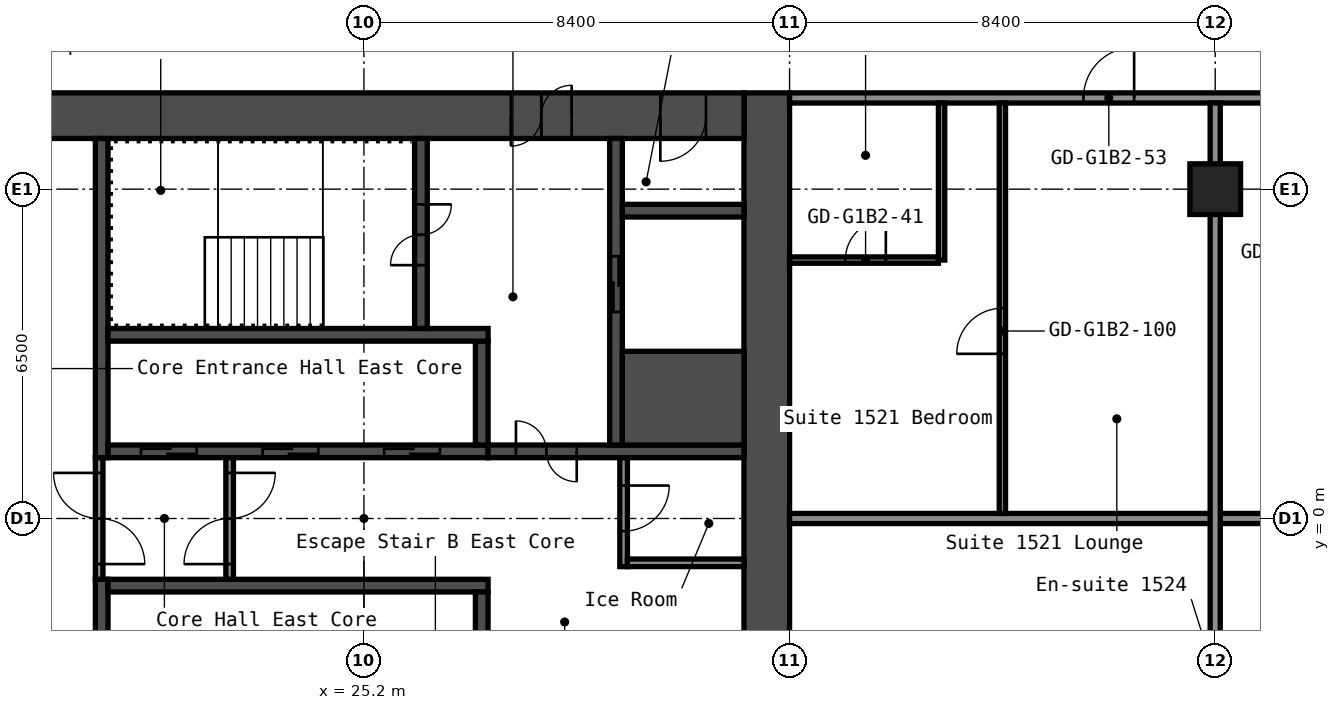
"""IFC4 building model, lengths in metres.
Left out: names, types, materials, properties, quantities, classifications, styles, units other than length and angle.
Written with IfcOpenShell. Run it as: python <this file> out.ifc"""

import sys

from ifc_helpers import new_model, si_unit, direction, frame, frame_2d, origin, origin_2d, place, context, subcontext, project, spatial, rectangle, hollow_rectangle, extrude, element, fill, save


model = new_model("IFC4")
c1 = context("Model", 3, precision=1e-05, world=origin(), true_north=direction((0.0, 1.0)))
c2 = subcontext(c1, "Body", "Model", "MODEL_VIEW")
j1 = project(units=[si_unit("LENGTHUNIT", "METRE"), si_unit("PLANEANGLEUNIT", "RADIAN")], contexts=[c1])
p1 = place(None, origin())
s1 = spatial("IfcSite", under=j1, at=p1, CompositionType="ELEMENT")
p2 = place(p1, origin())
s2 = spatial("IfcBuilding", under=s1, at=p2, CompositionType="ELEMENT")
p3 = place(p2, frame((0.0, 0.0, 55.0)))
s3 = spatial("IfcBuildingStorey", under=s2, at=p3, CompositionType="ELEMENT", Elevation=55.0)
p4 = place(p3, frame((42.0, 6.5, 0.0), z_axis=(0.0, 0.0, 1.0), x_axis=(1.0, 0.0, 0.0)))
e1 = element("IfcColumn", 1, at=p4, inside=s3, PredefinedType="COLUMN", context=c2, shape_type="SweptSolid", body=[
    extrude(hollow_rectangle(XDim=1.0, YDim=1.0, WallThickness=0.04, at=origin_2d()), origin(), (0.0, 0.0, 1.0), 2.8),
])
p5 = place(p3, frame((33.15, -8.4, 0.0), z_axis=(0.0, 0.0, 1.0), x_axis=(0.0, 1.0, 0.0)))
e2 = element("IfcWall", 2, at=p5, inside=s3, PredefinedType="SHEAR", context=c2, shape_type="SweptSolid", body=[
    extrude(rectangle(XDim=16.8, YDim=0.9, at=frame_2d((8.4, 0.0))), origin(), (0.0, 0.0, 1.0), 2.8),
])
p6 = place(p3, frame((17.7, 7.95, 0.0), z_axis=(0.0, 0.0, 1.0), x_axis=(1.0, 0.0, 0.0)))
e3 = element("IfcWall", 3, at=p6, inside=s3, PredefinedType="SHEAR", context=c2, shape_type="SweptSolid", body=[
    extrude(rectangle(XDim=15.0, YDim=0.9, at=frame_2d((7.5, 0.0))), origin(), (0.0, 0.0, 1.0), 2.8),
])
p7 = place(p6, frame((10.4, 0.0, 0.0)))
e4 = element("IfcOpeningElement", 4, at=p7, cuts=e3, PredefinedType="OPENING", context=c2, shape_type="SweptSolid", body=[
    extrude(rectangle(XDim=1.2, YDim=2.1, at=frame_2d((0.6, 1.05))), frame((0.0, 0.46, 0.0), z_axis=(0.0, -1.0, 0.0), x_axis=(1.0, 0.0, 0.0)), (0.0, 0.0, 1.0), 0.92),
])
p8 = place(p6, frame((13.35, 0.0, 0.0)))
e5 = element("IfcOpeningElement", 5, at=p8, cuts=e3, PredefinedType="OPENING", context=c2, shape_type="SweptSolid", body=[
    extrude(rectangle(XDim=0.9, YDim=2.1, at=frame_2d((0.45, 1.05))), frame((0.0, 0.46, 0.0), z_axis=(0.0, -1.0, 0.0), x_axis=(1.0, 0.0, 0.0)), (0.0, 0.0, 1.0), 0.92),
])
p9 = place(p3, frame((20.025, 1.2, 0.0), z_axis=(0.0, 0.0, 1.0), x_axis=(0.0, 1.0, 0.0)))
e6 = element("IfcWall", 6, at=p9, inside=s3, PredefinedType="SHEAR", context=c2, shape_type="SweptSolid", body=[
    extrude(rectangle(XDim=6.3, YDim=0.25, at=frame_2d((3.15, 0.0))), origin(), (0.0, 0.0, 1.0), 2.8),
])
p10 = place(p3, frame((20.025, -7.5, 0.0), z_axis=(0.0, 0.0, 1.0), x_axis=(0.0, 1.0, 0.0)))
e7 = element("IfcWall", 7, at=p10, inside=s3, PredefinedType="SHEAR", context=c2, shape_type="SweptSolid", body=[
    extrude(rectangle(XDim=6.3, YDim=0.25, at=frame_2d((3.15, 0.0))), origin(), (0.0, 0.0, 1.0), 2.8),
])
p11 = place(p10, frame((2.4, 0.0, 0.0)))
e8 = element("IfcOpeningElement", 8, at=p11, cuts=e7, PredefinedType="OPENING", context=c2, shape_type="SweptSolid", body=[
    extrude(rectangle(XDim=1.0, YDim=2.1, at=frame_2d((0.5, 1.05))), frame((0.0, 0.135, 0.0), z_axis=(0.0, -1.0, 0.0), x_axis=(1.0, 0.0, 0.0)), (0.0, 0.0, 1.0), 0.27),
])
p12 = place(p3, frame((20.15, 1.325, 0.0), z_axis=(0.0, 0.0, 1.0), x_axis=(1.0, 0.0, 0.0)))
e9 = element("IfcWall", 9, at=p12, inside=s3, PredefinedType="SHEAR", context=c2, shape_type="SweptSolid", body=[
    extrude(rectangle(XDim=7.5, YDim=0.25, at=frame_2d((3.75, 0.0))), origin(), (0.0, 0.0, 1.0), 2.8),
])
p13 = place(p12, frame((0.65, 0.0, 0.0)))
e10 = element("IfcOpeningElement", 10, at=p13, cuts=e9, PredefinedType="OPENING", context=c2, shape_type="SweptSolid", body=[
    extrude(rectangle(XDim=1.1, YDim=2.1, at=frame_2d((0.55, 1.05))), frame((0.0, 0.135, 0.0), z_axis=(0.0, -1.0, 0.0), x_axis=(1.0, 0.0, 0.0)), (0.0, 0.0, 1.0), 0.27),
])
p14 = place(p12, frame((3.05, 0.0, 0.0)))
e11 = element("IfcOpeningElement", 11, at=p14, cuts=e9, PredefinedType="OPENING", context=c2, shape_type="SweptSolid", body=[
    extrude(rectangle(XDim=1.1, YDim=2.1, at=frame_2d((0.55, 1.05))), frame((0.0, 0.135, 0.0), z_axis=(0.0, -1.0, 0.0), x_axis=(1.0, 0.0, 0.0)), (0.0, 0.0, 1.0), 0.27),
])
p15 = place(p12, frame((5.45, 0.0, 0.0)))
e12 = element("IfcOpeningElement", 12, at=p15, cuts=e9, PredefinedType="OPENING", context=c2, shape_type="SweptSolid", body=[
    extrude(rectangle(XDim=1.1, YDim=2.1, at=frame_2d((0.55, 1.05))), frame((0.0, 0.135, 0.0), z_axis=(0.0, -1.0, 0.0), x_axis=(1.0, 0.0, 0.0)), (0.0, 0.0, 1.0), 0.27),
])
p16 = place(p3, frame((27.525, 1.45, 0.0), z_axis=(0.0, 0.0, 1.0), x_axis=(0.0, 1.0, 0.0)))
e13 = element("IfcWall", 13, at=p16, inside=s3, PredefinedType="SHEAR", context=c2, shape_type="SweptSolid", body=[
    extrude(rectangle(XDim=2.05, YDim=0.25, at=frame_2d((1.025, 0.0))), origin(), (0.0, 0.0, 1.0), 2.8),
])
p17 = place(p3, frame((20.15, 3.625, 0.0), z_axis=(0.0, 0.0, 1.0), x_axis=(1.0, 0.0, 0.0)))
e14 = element("IfcWall", 14, at=p17, inside=s3, PredefinedType="SHEAR", context=c2, shape_type="SweptSolid", body=[
    extrude(rectangle(XDim=7.5, YDim=0.25, at=frame_2d((3.75, 0.0))), origin(), (0.0, 0.0, 1.0), 2.8),
])
p18 = place(p3, frame((26.325, 3.75, 0.0), z_axis=(0.0, 0.0, 1.0), x_axis=(0.0, 1.0, 0.0)))
e15 = element("IfcWall", 15, at=p18, inside=s3, PredefinedType="SHEAR", context=c2, shape_type="SweptSolid", body=[
    extrude(rectangle(XDim=3.75, YDim=0.25, at=frame_2d((1.875, 0.0))), origin(), (0.0, 0.0, 1.0), 2.8),
])
p19 = place(p18, frame((1.25, 0.0, 0.0)))
e16 = element("IfcOpeningElement", 16, at=p19, cuts=e15, PredefinedType="OPENING", context=c2, shape_type="SweptSolid", body=[
    extrude(rectangle(XDim=1.2, YDim=2.1, at=frame_2d((0.6, 1.05))), frame((0.0, 0.135, 0.0), z_axis=(0.0, -1.0, 0.0), x_axis=(1.0, 0.0, 0.0)), (0.0, 0.0, 1.0), 0.27),
])
p20 = place(p3, frame((27.65, 1.325, 0.0), z_axis=(0.0, 0.0, 1.0), x_axis=(1.0, 0.0, 0.0)))
e17 = element("IfcWall", 17, at=p20, inside=s3, PredefinedType="SHEAR", context=c2, shape_type="SweptSolid", body=[
    extrude(rectangle(XDim=5.05, YDim=0.25, at=frame_2d((2.525, 0.0))), origin(), (0.0, 0.0, 1.0), 2.8),
])
p21 = place(p20, frame((0.55, 0.0, 0.0)))
e18 = element("IfcOpeningElement", 18, at=p21, cuts=e17, PredefinedType="OPENING", context=c2, shape_type="SweptSolid", body=[
    extrude(rectangle(XDim=1.2, YDim=2.1, at=frame_2d((0.6, 1.05))), frame((0.0, 0.135, 0.0), z_axis=(0.0, -1.0, 0.0), x_axis=(1.0, 0.0, 0.0)), (0.0, 0.0, 1.0), 0.27),
])
p22 = place(p3, frame((30.175, 1.45, 0.0), z_axis=(0.0, 0.0, 1.0), x_axis=(0.0, 1.0, 0.0)))
e19 = element("IfcWall", 19, at=p22, inside=s3, PredefinedType="SHEAR", context=c2, shape_type="SweptSolid", body=[
    extrude(rectangle(XDim=6.05, YDim=0.25, at=frame_2d((3.025, 0.0))), origin(), (0.0, 0.0, 1.0), 2.8),
])
p23 = place(p22, frame((2.625, 0.0, 0.0)))
e20 = element("IfcOpeningElement", 20, at=p23, cuts=e19, PredefinedType="OPENING", context=c2, shape_type="SweptSolid", body=[
    extrude(rectangle(XDim=1.1, YDim=2.1, at=frame_2d((0.55, 1.05))), frame((0.0, 0.135, 0.0), z_axis=(0.0, -1.0, 0.0), x_axis=(1.0, 0.0, 0.0)), (0.0, 0.0, 1.0), 0.27),
])
p24 = place(p3, frame((30.3, 2.375, 0.0), z_axis=(0.0, 0.0, 1.0), x_axis=(1.0, 0.0, 0.0)))
e21 = element("IfcWall", 21, at=p24, inside=s3, PredefinedType="SHEAR", context=c2, shape_type="SweptSolid", body=[
    extrude(rectangle(XDim=2.4, YDim=1.85, at=frame_2d((1.2, 0.0))), origin(), (0.0, 0.0, 1.0), 2.8),
])
p25 = place(p3, frame((30.3, 6.075, 0.0), z_axis=(0.0, 0.0, 1.0), x_axis=(1.0, 0.0, 0.0)))
e22 = element("IfcWall", 22, at=p25, inside=s3, PredefinedType="SHEAR", context=c2, shape_type="SweptSolid", body=[
    extrude(rectangle(XDim=2.4, YDim=0.25, at=frame_2d((1.2, 0.0))), origin(), (0.0, 0.0, 1.0), 2.8),
])
p26 = place(p3, frame((20.15, -1.325, 0.0), z_axis=(0.0, 0.0, 1.0), x_axis=(1.0, 0.0, 0.0)))
e23 = element("IfcWall", 23, at=p26, inside=s3, PredefinedType="SHEAR", context=c2, shape_type="SweptSolid", body=[
    extrude(rectangle(XDim=7.5, YDim=0.25, at=frame_2d((3.75, 0.0))), origin(), (0.0, 0.0, 1.0), 2.8),
])
p27 = place(p3, frame((27.525, -3.5, 0.0), z_axis=(0.0, 0.0, 1.0), x_axis=(0.0, 1.0, 0.0)))
e24 = element("IfcWall", 24, at=p27, inside=s3, PredefinedType="SHEAR", context=c2, shape_type="SweptSolid", body=[
    extrude(rectangle(XDim=2.05, YDim=0.25, at=frame_2d((1.025, 0.0))), origin(), (0.0, 0.0, 1.0), 2.8),
])
p28 = place(p3, frame((19.975, -1.2, 0.0), z_axis=(0.0, 0.0, 1.0), x_axis=(0.0, 1.0, 0.0)))
e25 = element("IfcWall", 25, at=p28, inside=s3, PredefinedType="PARTITIONING", context=c2, shape_type="SweptSolid", body=[
    extrude(rectangle(XDim=2.4, YDim=0.15, at=frame_2d((1.2, 0.0))), origin(), (0.0, 0.0, 1.0), 2.8),
])
p29 = place(p28, frame((0.3, 0.0, 0.0)))
e26 = element("IfcOpeningElement", 26, at=p29, cuts=e25, PredefinedType="OPENING", context=c2, shape_type="SweptSolid", body=[
    extrude(rectangle(XDim=1.8, YDim=2.1, at=frame_2d((0.9, 1.05))), frame((0.0, 0.085, 0.0), z_axis=(0.0, -1.0, 0.0), x_axis=(1.0, 0.0, 0.0)), (0.0, 0.0, 1.0), 0.17),
])
p30 = place(p3, frame((22.55, -1.2, 0.0), z_axis=(0.0, 0.0, 1.0), x_axis=(0.0, 1.0, 0.0)))
e27 = element("IfcWall", 27, at=p30, inside=s3, PredefinedType="PARTITIONING", context=c2, shape_type="SweptSolid", body=[
    extrude(rectangle(XDim=2.4, YDim=0.15, at=frame_2d((1.2, 0.0))), origin(), (0.0, 0.0, 1.0), 2.8),
])
p31 = place(p30, frame((0.3, 0.0, 0.0)))
e28 = element("IfcOpeningElement", 28, at=p31, cuts=e27, PredefinedType="OPENING", context=c2, shape_type="SweptSolid", body=[
    extrude(rectangle(XDim=1.8, YDim=2.1, at=frame_2d((0.9, 1.05))), frame((0.0, 0.085, 0.0), z_axis=(0.0, -1.0, 0.0), x_axis=(1.0, 0.0, 0.0)), (0.0, 0.0, 1.0), 0.17),
])
p32 = place(p3, frame((30.325, -0.95, 0.0), z_axis=(0.0, 0.0, 1.0), x_axis=(0.0, 1.0, 0.0)))
e29 = element("IfcWall", 29, at=p32, inside=s3, PredefinedType="PARTITIONING", context=c2, shape_type="SweptSolid", body=[
    extrude(rectangle(XDim=2.15, YDim=0.15, at=frame_2d((1.075, 0.0))), origin(), (0.0, 0.0, 1.0), 2.8),
])
p33 = place(p32, frame((0.7, 0.0, 0.0)))
e30 = element("IfcOpeningElement", 30, at=p33, cuts=e29, PredefinedType="OPENING", context=c2, shape_type="SweptSolid", body=[
    extrude(rectangle(XDim=0.9, YDim=2.1, at=frame_2d((0.45, 1.05))), frame((0.0, 0.085, 0.0), z_axis=(0.0, -1.0, 0.0), x_axis=(1.0, 0.0, 0.0)), (0.0, 0.0, 1.0), 0.17),
])
p34 = place(p3, frame((30.4, -0.875, 0.0), z_axis=(0.0, 0.0, 1.0), x_axis=(1.0, 0.0, 0.0)))
e31 = element("IfcWall", 31, at=p34, inside=s3, PredefinedType="PARTITIONING", context=c2, shape_type="SweptSolid", body=[
    extrude(rectangle(XDim=2.3, YDim=0.15, at=frame_2d((1.15, 0.0))), origin(), (0.0, 0.0, 1.0), 2.8),
])
p35 = place(p3, frame((33.6, 0.0, 0.0), z_axis=(0.0, 0.0, 1.0), x_axis=(1.0, 0.0, 0.0)))
e32 = element("IfcWall", 32, at=p35, inside=s3, PredefinedType="PARTITIONING", context=c2, shape_type="SweptSolid", body=[
    extrude(rectangle(XDim=14.9, YDim=0.2, at=frame_2d((7.45, 0.0))), origin(), (0.0, 0.0, 1.0), 2.8),
])
p36 = place(p3, frame((33.6, 5.1, 0.0), z_axis=(0.0, 0.0, 1.0), x_axis=(1.0, 0.0, 0.0)))
e33 = element("IfcWall", 33, at=p36, inside=s3, PredefinedType="PARTITIONING", context=c2, shape_type="SweptSolid", body=[
    extrude(rectangle(XDim=2.938, YDim=0.125, at=frame_2d((1.469, 0.0))), origin(), (0.0, 0.0, 1.0), 2.8),
])
p37 = place(p36, frame((1.1, 0.0, 0.0)))
e34 = element("IfcOpeningElement", 34, at=p37, cuts=e33, PredefinedType="OPENING", context=c2, shape_type="SweptSolid", body=[
    extrude(rectangle(XDim=0.8, YDim=2.1, at=frame_2d((0.4, 1.05))), frame((0.0, 0.073, 0.0), z_axis=(0.0, -1.0, 0.0), x_axis=(1.0, 0.0, 0.0)), (0.0, 0.0, 1.0), 0.145),
])
p38 = place(p3, frame((33.6, 8.3, 0.0), z_axis=(0.0, 0.0, 1.0), x_axis=(1.0, 0.0, 0.0)))
e35 = element("IfcWall", 35, at=p38, inside=s3, PredefinedType="PARTITIONING", context=c2, shape_type="SweptSolid", body=[
    extrude(rectangle(XDim=15.0, YDim=0.2, at=frame_2d((7.5, 0.0))), origin(), (0.0, 0.0, 1.0), 2.8),
])
p39 = place(p38, frame((5.8, 0.0, 0.0)))
e36 = element("IfcOpeningElement", 36, at=p39, cuts=e35, PredefinedType="OPENING", context=c2, shape_type="SweptSolid", body=[
    extrude(rectangle(XDim=1.0, YDim=2.1, at=frame_2d((0.5, 1.05))), frame((0.0, 0.11, 0.0), z_axis=(0.0, -1.0, 0.0), x_axis=(1.0, 0.0, 0.0)), (0.0, 0.0, 1.0), 0.22),
])
p40 = place(p38, frame((9.55, 0.0, 0.0)))
e37 = element("IfcOpeningElement", 37, at=p40, cuts=e35, PredefinedType="OPENING", context=c2, shape_type="SweptSolid", body=[
    extrude(rectangle(XDim=1.0, YDim=2.1, at=frame_2d((0.5, 1.05))), frame((0.0, 0.11, 0.0), z_axis=(0.0, -1.0, 0.0), x_axis=(1.0, 0.0, 0.0)), (0.0, 0.0, 1.0), 0.22),
])
p41 = place(p3, frame((36.6, 5.1, 0.0), z_axis=(0.0, 0.0, 1.0), x_axis=(0.0, 1.0, 0.0)))
e38 = element("IfcWall", 38, at=p41, inside=s3, PredefinedType="PARTITIONING", context=c2, shape_type="SweptSolid", body=[
    extrude(rectangle(XDim=3.1, YDim=0.125, at=frame_2d((1.55, 0.0))), origin(), (0.0, 0.0, 1.0), 2.8),
])
p42 = place(p3, frame((37.8, 0.1, 0.0), z_axis=(0.0, 0.0, 1.0), x_axis=(0.0, 1.0, 0.0)))
e39 = element("IfcWall", 39, at=p42, inside=s3, PredefinedType="PARTITIONING", context=c2, shape_type="SweptSolid", body=[
    extrude(rectangle(XDim=8.1, YDim=0.125, at=frame_2d((4.05, 0.0))), origin(), (0.0, 0.0, 1.0), 2.8),
])
p43 = place(p42, frame((3.15, 0.0, 0.0)))
e40 = element("IfcOpeningElement", 40, at=p43, cuts=e39, PredefinedType="OPENING", context=c2, shape_type="SweptSolid", body=[
    extrude(rectangle(XDim=0.9, YDim=2.1, at=frame_2d((0.45, 1.05))), frame((0.0, 0.073, 0.0), z_axis=(0.0, -1.0, 0.0), x_axis=(1.0, 0.0, 0.0)), (0.0, 0.0, 1.0), 0.145),
])
p44 = place(p3, frame((42.0, -8.2, 0.0), z_axis=(0.0, 0.0, 1.0), x_axis=(0.0, 1.0, 0.0)))
e41 = element("IfcWall", 41, at=p44, inside=s3, PredefinedType="PARTITIONING", context=c2, shape_type="SweptSolid", body=[
    extrude(rectangle(XDim=16.4, YDim=0.2, at=frame_2d((8.2, 0.0))), origin(), (0.0, 0.0, 1.0), 2.8),
])
p45 = place(p7, origin())
e42 = element("IfcDoor", 42, at=p45, inside=s3, OperationType="DOUBLE_DOOR_SINGLE_SWING", PredefinedType="DOOR", context=c2, shape_type="SweptSolid", body=[
    extrude(rectangle(XDim=1.2, YDim=2.1, at=frame_2d((0.6, 1.05))), frame((0.0, 0.025, 0.0), z_axis=(0.0, -1.0, 0.0), x_axis=(1.0, 0.0, 0.0)), (0.0, 0.0, 1.0), 0.05),
])
fill(e4, e42)
p46 = place(p8, origin())
e43 = element("IfcDoor", 43, at=p46, inside=s3, OperationType="SINGLE_SWING_LEFT", PredefinedType="DOOR", context=c2, shape_type="SweptSolid", body=[
    extrude(rectangle(XDim=0.9, YDim=2.1, at=frame_2d((0.45, 1.05))), frame((0.0, 0.025, 0.0), z_axis=(0.0, -1.0, 0.0), x_axis=(1.0, 0.0, 0.0)), (0.0, 0.0, 1.0), 0.05),
])
fill(e5, e43)
p47 = place(p19, origin())
e44 = element("IfcDoor", 44, at=p47, inside=s3, OperationType="DOUBLE_DOOR_SINGLE_SWING", PredefinedType="DOOR", context=c2, shape_type="SweptSolid", body=[
    extrude(rectangle(XDim=1.2, YDim=2.1, at=frame_2d((0.6, 1.05))), frame((0.0, 0.025, 0.0), z_axis=(0.0, -1.0, 0.0), x_axis=(1.0, 0.0, 0.0)), (0.0, 0.0, 1.0), 0.05),
])
fill(e16, e44)
p48 = place(p21, origin())
e45 = element("IfcDoor", 45, at=p48, inside=s3, OperationType="DOUBLE_DOOR_SINGLE_SWING", PredefinedType="DOOR", context=c2, shape_type="SweptSolid", body=[
    extrude(rectangle(XDim=1.2, YDim=2.1, at=frame_2d((0.6, 1.05))), frame((0.0, 0.025, 0.0), z_axis=(0.0, -1.0, 0.0), x_axis=(1.0, 0.0, 0.0)), (0.0, 0.0, 1.0), 0.05),
])
fill(e18, e45)
p49 = place(p29, origin())
e46 = element("IfcDoor", 46, at=p49, inside=s3, OperationType="DOUBLE_DOOR_SINGLE_SWING", PredefinedType="DOOR", context=c2, shape_type="SweptSolid", body=[
    extrude(rectangle(XDim=1.8, YDim=2.1, at=frame_2d((0.9, 1.05))), frame((0.0, 0.025, 0.0), z_axis=(0.0, -1.0, 0.0), x_axis=(1.0, 0.0, 0.0)), (0.0, 0.0, 1.0), 0.05),
])
fill(e26, e46)
p50 = place(p31, origin())
e47 = element("IfcDoor", 47, at=p50, inside=s3, OperationType="DOUBLE_DOOR_SINGLE_SWING", PredefinedType="DOOR", context=c2, shape_type="SweptSolid", body=[
    extrude(rectangle(XDim=1.8, YDim=2.1, at=frame_2d((0.9, 1.05))), frame((0.0, 0.025, 0.0), z_axis=(0.0, -1.0, 0.0), x_axis=(1.0, 0.0, 0.0)), (0.0, 0.0, 1.0), 0.05),
])
fill(e28, e47)
p51 = place(p33, origin())
e48 = element("IfcDoor", 48, at=p51, inside=s3, OperationType="SINGLE_SWING_RIGHT", PredefinedType="DOOR", context=c2, shape_type="SweptSolid", body=[
    extrude(rectangle(XDim=0.9, YDim=2.1, at=frame_2d((0.45, 1.05))), frame((0.0, 0.025, 0.0), z_axis=(0.0, -1.0, 0.0), x_axis=(1.0, 0.0, 0.0)), (0.0, 0.0, 1.0), 0.05),
])
fill(e30, e48)
p52 = place(p13, origin())
e49 = element("IfcDoor", 49, at=p52, inside=s3, OperationType="DOUBLE_DOOR_SLIDING", PredefinedType="DOOR", context=c2, shape_type="SweptSolid", body=[
    extrude(rectangle(XDim=1.1, YDim=2.1, at=frame_2d((0.55, 1.05))), frame((0.0, 0.025, 0.0), z_axis=(0.0, -1.0, 0.0), x_axis=(1.0, 0.0, 0.0)), (0.0, 0.0, 1.0), 0.05),
])
fill(e10, e49)
p53 = place(p14, origin())
e50 = element("IfcDoor", 50, at=p53, inside=s3, OperationType="DOUBLE_DOOR_SLIDING", PredefinedType="DOOR", context=c2, shape_type="SweptSolid", body=[
    extrude(rectangle(XDim=1.1, YDim=2.1, at=frame_2d((0.55, 1.05))), frame((0.0, 0.025, 0.0), z_axis=(0.0, -1.0, 0.0), x_axis=(1.0, 0.0, 0.0)), (0.0, 0.0, 1.0), 0.05),
])
fill(e11, e50)
p54 = place(p15, origin())
e51 = element("IfcDoor", 51, at=p54, inside=s3, OperationType="DOUBLE_DOOR_SLIDING", PredefinedType="DOOR", context=c2, shape_type="SweptSolid", body=[
    extrude(rectangle(XDim=1.1, YDim=2.1, at=frame_2d((0.55, 1.05))), frame((0.0, 0.025, 0.0), z_axis=(0.0, -1.0, 0.0), x_axis=(1.0, 0.0, 0.0)), (0.0, 0.0, 1.0), 0.05),
])
fill(e12, e51)
p55 = place(p23, origin())
e52 = element("IfcDoor", 52, at=p55, inside=s3, OperationType="DOUBLE_DOOR_SLIDING", PredefinedType="DOOR", context=c2, shape_type="SweptSolid", body=[
    extrude(rectangle(XDim=1.1, YDim=2.1, at=frame_2d((0.55, 1.05))), frame((0.0, 0.025, 0.0), z_axis=(0.0, -1.0, 0.0), x_axis=(1.0, 0.0, 0.0)), (0.0, 0.0, 1.0), 0.05),
])
fill(e20, e52)
p56 = place(p37, origin())
e53 = element("IfcDoor", 53, at=p56, inside=s3, OperationType="SINGLE_SWING_LEFT", PredefinedType="DOOR", context=c2, shape_type="SweptSolid", body=[
    extrude(rectangle(XDim=0.8, YDim=2.1, at=frame_2d((0.4, 1.05))), frame((0.0, 0.025, 0.0), z_axis=(0.0, -1.0, 0.0), x_axis=(1.0, 0.0, 0.0)), (0.0, 0.0, 1.0), 0.05),
])
fill(e34, e53)
p57 = place(p39, origin())
e54 = element("IfcDoor", 54, at=p57, inside=s3, OperationType="SINGLE_SWING_LEFT", PredefinedType="DOOR", context=c2, shape_type="SweptSolid", body=[
    extrude(rectangle(XDim=1.0, YDim=2.1, at=frame_2d((0.5, 1.05))), frame((0.0, 0.025, 0.0), z_axis=(0.0, -1.0, 0.0), x_axis=(1.0, 0.0, 0.0)), (0.0, 0.0, 1.0), 0.05),
])
fill(e36, e54)
p58 = place(p43, origin())
e55 = element("IfcDoor", 55, at=p58, inside=s3, OperationType="SINGLE_SWING_RIGHT", PredefinedType="DOOR", context=c2, shape_type="SweptSolid", body=[
    extrude(rectangle(XDim=0.9, YDim=2.1, at=frame_2d((0.45, 1.05))), frame((0.0, 0.025, 0.0), z_axis=(0.0, -1.0, 0.0), x_axis=(1.0, 0.0, 0.0)), (0.0, 0.0, 1.0), 0.05),
])
fill(e40, e55)
save(model, sys.argv[1])
